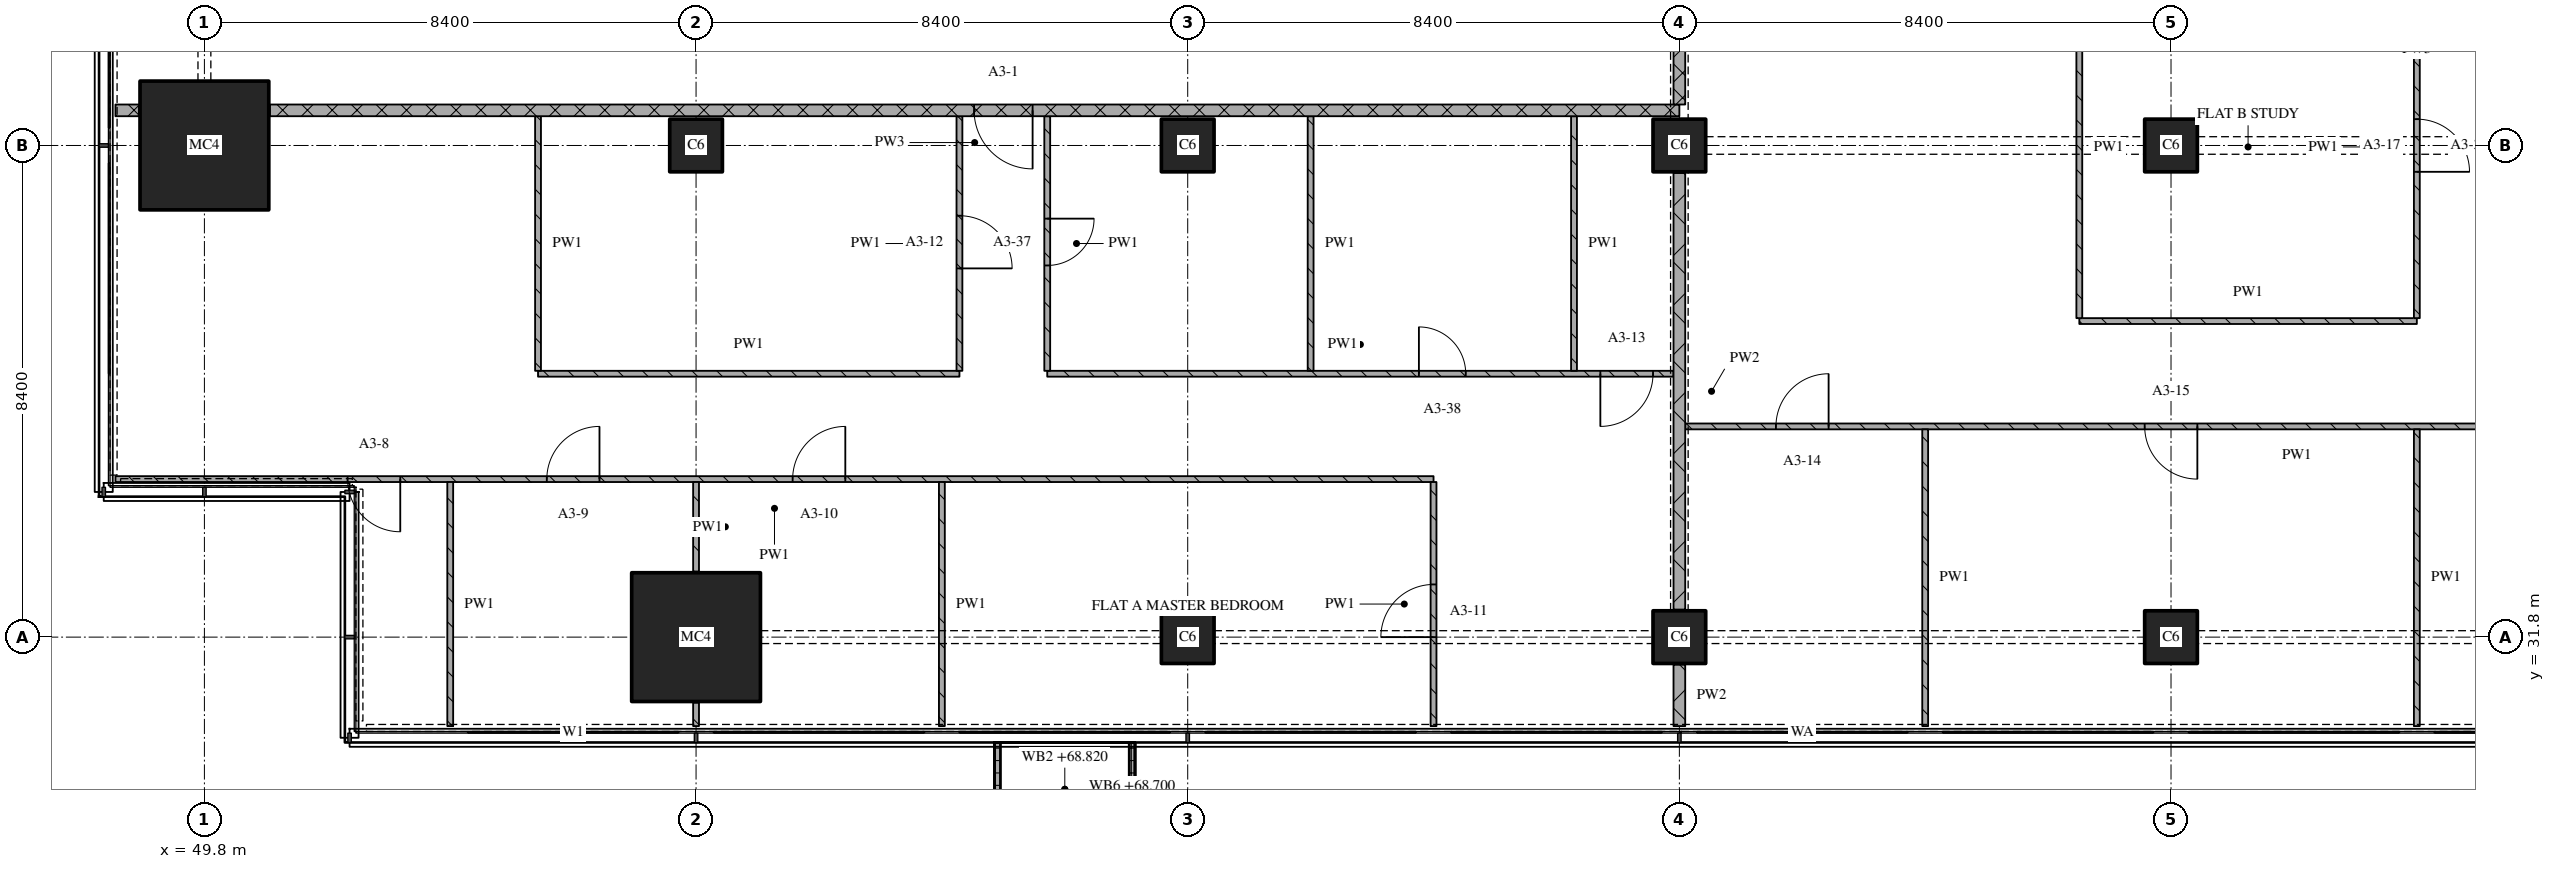
"""IFC4 building model, lengths in metres.
Left out: names, types, materials, properties, quantities, classifications, styles, units other than length and angle.
Written with IfcOpenShell. Run it as: python <this file> out.ifc"""

import sys

from ifc_helpers import new_model, si_unit, direction, frame, frame_2d, origin, origin_2d, place, context, subcontext, project, spatial, polyline, rectangle, outline, extrude, element, fill, save


model = new_model("IFC4")
c1 = context("Model", 3, precision=1e-05, world=origin(), true_north=direction((0.0, 1.0)))
c2 = subcontext(c1, "Body", "Model", "MODEL_VIEW")
j1 = project(units=[si_unit("LENGTHUNIT", "METRE"), si_unit("PLANEANGLEUNIT", "RADIAN")], contexts=[c1])
p1 = place(None, origin())
s1 = spatial("IfcSite", under=j1, at=p1, CompositionType="ELEMENT")
p2 = place(p1, origin())
s2 = spatial("IfcBuilding", under=s1, at=p2, CompositionType="ELEMENT")
p3 = place(p2, frame((0.0, 0.0, 66.0)))
s3 = spatial("IfcBuildingStorey", under=s2, at=p3, CompositionType="ELEMENT", Elevation=66.0)
for number, where, z_axis, x_axis in (
    (1, (49.8, 40.2, 0.0), (0.0, 0.0, 1.0), (1.0, 0.0, 0.0)),
    (2, (58.2, 31.8, 0.0), (0.0, 0.0, 1.0), (1.0, 0.0, 0.0)),
):
    element("IfcColumn", number, at=place(p3, frame(where, z_axis=z_axis, x_axis=x_axis)), inside=s3, PredefinedType="COLUMN", context=c2, shape_type="SweptSolid", body=[
        extrude(rectangle(XDim=2.2, YDim=2.2, at=origin_2d()), origin(), (0.0, 0.0, 1.0), 3.6),
    ])
for number, where, z_axis, x_axis in (
    (3, (58.2, 40.2, 0.0), (0.0, 0.0, 1.0), (1.0, 0.0, 0.0)),
    (4, (66.6, 31.8, 0.0), (0.0, 0.0, 1.0), (1.0, 0.0, 0.0)),
    (5, (66.6, 40.2, 0.0), (0.0, 0.0, 1.0), (1.0, 0.0, 0.0)),
    (6, (75.0, 31.8, 0.0), (0.0, 0.0, 1.0), (1.0, 0.0, 0.0)),
    (7, (75.0, 40.2, 0.0), (0.0, 0.0, 1.0), (1.0, 0.0, 0.0)),
    (8, (83.4, 31.8, 0.0), (0.0, 0.0, 1.0), (1.0, 0.0, 0.0)),
    (9, (83.4, 40.2, 0.0), (0.0, 0.0, 1.0), (1.0, 0.0, 0.0)),
):
    element("IfcColumn", number, at=place(p3, frame(where, z_axis=z_axis, x_axis=x_axis)), inside=s3, PredefinedType="COLUMN", context=c2, shape_type="SweptSolid", body=[
        extrude(rectangle(XDim=0.9, YDim=0.9, at=origin_2d()), origin(), (0.0, 0.0, 1.0), 3.6),
    ])
p4 = place(p3, origin())
e10 = element("IfcWall", 10, at=p4, inside=s3, PredefinedType="SOLIDWALL", context=c2, shape_type="SweptSolid", body=[
    extrude(outline(polyline([(63.3, 30.0), (63.4, 30.0), (63.4, 28.5), (65.6, 28.5), (65.6, 30.0), (65.7, 30.0), (65.7, 28.4), (63.3, 28.4), (63.3, 30.0)])), origin(), (0.0, 0.0, 1.0), 1.0),
])
p5 = place(p3, frame((70.8, 34.5, 0.0), z_axis=(0.0, 0.0, 1.0), x_axis=(-1.0, 0.0, 0.0)))
e11 = element("IfcWall", 11, at=p5, inside=s3, PredefinedType="PARTITIONING", context=c2, shape_type="SweptSolid", body=[
    extrude(rectangle(XDim=22.52, YDim=0.1, at=frame_2d((11.26, 0.0))), origin(), (0.0, 0.0, 1.0), 3.32),
])
p6 = place(p5, frame((10.05, 0.0, 0.0)))
e12 = element("IfcOpeningElement", 12, at=p6, cuts=e11, PredefinedType="OPENING", context=c2, shape_type="SweptSolid", body=[
    extrude(rectangle(XDim=0.9, YDim=2.1, at=frame_2d((0.45, 1.05))), frame((0.0, 0.06, 0.0), z_axis=(0.0, -1.0, 0.0), x_axis=(1.0, 0.0, 0.0)), (0.0, 0.0, 1.0), 0.12),
])
p7 = place(p5, frame((14.25, 0.0, 0.0)))
e13 = element("IfcOpeningElement", 13, at=p7, cuts=e11, PredefinedType="OPENING", context=c2, shape_type="SweptSolid", body=[
    extrude(rectangle(XDim=0.9, YDim=2.1, at=frame_2d((0.45, 1.05))), frame((0.0, 0.06, 0.0), z_axis=(0.0, -1.0, 0.0), x_axis=(1.0, 0.0, 0.0)), (0.0, 0.0, 1.0), 0.12),
])
p8 = place(p5, frame((17.654, 0.0, 0.0)))
e14 = element("IfcOpeningElement", 14, at=p8, cuts=e11, PredefinedType="OPENING", context=c2, shape_type="SweptSolid", body=[
    extrude(rectangle(XDim=0.9, YDim=2.1, at=frame_2d((0.45, 1.05))), frame((0.0, 0.06, 0.0), z_axis=(0.0, -1.0, 0.0), x_axis=(1.0, 0.0, 0.0)), (0.0, 0.0, 1.0), 0.12),
])
p9 = place(p3, frame((96.0, 35.4, 0.0), z_axis=(0.0, 0.0, 1.0), x_axis=(-1.0, 0.0, 0.0)))
e15 = element("IfcWall", 15, at=p9, inside=s3, PredefinedType="PARTITIONING", context=c2, shape_type="SweptSolid", body=[
    extrude(rectangle(XDim=20.9, YDim=0.1, at=frame_2d((10.45, 0.0))), origin(), (0.0, 0.0, 1.0), 3.32),
])
p10 = place(p9, frame((12.15, 0.0, 0.0)))
e16 = element("IfcOpeningElement", 16, at=p10, cuts=e15, PredefinedType="OPENING", context=c2, shape_type="SweptSolid", body=[
    extrude(rectangle(XDim=0.9, YDim=2.1, at=frame_2d((0.45, 1.05))), frame((0.0, 0.06, 0.0), z_axis=(0.0, -1.0, 0.0), x_axis=(1.0, 0.0, 0.0)), (0.0, 0.0, 1.0), 0.12),
])
p11 = place(p9, frame((18.45, 0.0, 0.0)))
e17 = element("IfcOpeningElement", 17, at=p11, cuts=e15, PredefinedType="OPENING", context=c2, shape_type="SweptSolid", body=[
    extrude(rectangle(XDim=0.9, YDim=2.1, at=frame_2d((0.45, 1.05))), frame((0.0, 0.06, 0.0), z_axis=(0.0, -1.0, 0.0), x_axis=(1.0, 0.0, 0.0)), (0.0, 0.0, 1.0), 0.12),
])
p12 = place(p3, frame((55.5, 36.3, 0.0), z_axis=(0.0, 0.0, 1.0), x_axis=(1.0, 0.0, 0.0)))
e18 = element("IfcWall", 18, at=p12, inside=s3, PredefinedType="PARTITIONING", context=c2, shape_type="SweptSolid", body=[
    extrude(rectangle(XDim=7.2, YDim=0.1, at=frame_2d((3.6, 0.0))), origin(), (0.0, 0.0, 1.0), 3.32),
])
p13 = place(p3, frame((64.2, 36.3, 0.0), z_axis=(0.0, 0.0, 1.0), x_axis=(1.0, 0.0, 0.0)))
e19 = element("IfcWall", 19, at=p13, inside=s3, PredefinedType="PARTITIONING", context=c2, shape_type="SweptSolid", body=[
    extrude(rectangle(XDim=10.7, YDim=0.1, at=frame_2d((5.35, 0.0))), origin(), (0.0, 0.0, 1.0), 3.32),
])
p14 = place(p13, frame((6.35, 0.0, 0.0)))
e20 = element("IfcOpeningElement", 20, at=p14, cuts=e19, PredefinedType="OPENING", context=c2, shape_type="SweptSolid", body=[
    extrude(rectangle(XDim=0.8, YDim=2.1, at=frame_2d((0.4, 1.05))), frame((0.0, 0.06, 0.0), z_axis=(0.0, -1.0, 0.0), x_axis=(1.0, 0.0, 0.0)), (0.0, 0.0, 1.0), 0.12),
])
p15 = place(p13, frame((9.45, 0.0, 0.0)))
e21 = element("IfcOpeningElement", 21, at=p15, cuts=e19, PredefinedType="OPENING", context=c2, shape_type="SweptSolid", body=[
    extrude(rectangle(XDim=0.9, YDim=2.1, at=frame_2d((0.45, 1.05))), frame((0.0, 0.06, 0.0), z_axis=(0.0, -1.0, 0.0), x_axis=(1.0, 0.0, 0.0)), (0.0, 0.0, 1.0), 0.12),
])
p16 = place(p3, frame((81.833, 37.2, 0.0), z_axis=(0.0, 0.0, 1.0), x_axis=(1.0, 0.0, 0.0)))
e22 = element("IfcWall", 22, at=p16, inside=s3, PredefinedType="PARTITIONING", context=c2, shape_type="SweptSolid", body=[
    extrude(rectangle(XDim=5.767, YDim=0.1, at=frame_2d((2.883, 0.0))), origin(), (0.0, 0.0, 1.0), 3.32),
])
p17 = place(p3, frame((48.28, 40.8, 0.0), z_axis=(0.0, 0.0, 1.0), x_axis=(1.0, 0.0, 0.0)))
e23 = element("IfcWall", 23, at=p17, inside=s3, PredefinedType="PARTITIONING", context=c2, shape_type="SweptSolid", body=[
    extrude(rectangle(XDim=0.4, YDim=0.2, at=frame_2d((0.2, 0.0))), origin(), (0.0, 0.0, 1.0), 3.32),
])
p18 = place(p3, frame((75.0, 40.8, 0.0), z_axis=(0.0, 0.0, 1.0), x_axis=(-1.0, 0.0, 0.0)))
e24 = element("IfcWall", 24, at=p18, inside=s3, PredefinedType="PARTITIONING", context=c2, shape_type="SweptSolid", body=[
    extrude(rectangle(XDim=24.08, YDim=0.2, at=frame_2d((12.04, 0.0))), origin(), (0.0, 0.0, 1.0), 3.32),
])
p19 = place(p18, frame((11.05, 0.0, 0.0)))
e25 = element("IfcOpeningElement", 25, at=p19, cuts=e24, PredefinedType="OPENING", context=c2, shape_type="SweptSolid", body=[
    extrude(rectangle(XDim=1.0, YDim=2.1, at=frame_2d((0.5, 1.05))), frame((0.0, 0.11, 0.0), z_axis=(0.0, -1.0, 0.0), x_axis=(1.0, 0.0, 0.0)), (0.0, 0.0, 1.0), 0.22),
])
p20 = place(p3, frame((54.0, 34.45, 0.0), z_axis=(0.0, 0.0, 1.0), x_axis=(0.0, -1.0, 0.0)))
e26 = element("IfcWall", 26, at=p20, inside=s3, PredefinedType="PARTITIONING", context=c2, shape_type="SweptSolid", body=[
    extrude(rectangle(XDim=4.17, YDim=0.1, at=frame_2d((2.085, 0.0))), origin(), (0.0, 0.0, 1.0), 3.32),
])
p21 = place(p3, frame((55.5, 40.7, 0.0), z_axis=(0.0, 0.0, 1.0), x_axis=(0.0, -1.0, 0.0)))
e27 = element("IfcWall", 27, at=p21, inside=s3, PredefinedType="PARTITIONING", context=c2, shape_type="SweptSolid", body=[
    extrude(rectangle(XDim=4.35, YDim=0.1, at=frame_2d((2.175, 0.0))), origin(), (0.0, 0.0, 1.0), 3.32),
])
p22 = place(p3, frame((58.2, 30.68, 0.0), z_axis=(0.0, 0.0, 1.0), x_axis=(0.0, -1.0, 0.0)))
e28 = element("IfcWall", 28, at=p22, inside=s3, PredefinedType="PARTITIONING", context=c2, shape_type="SweptSolid", body=[
    extrude(rectangle(XDim=0.4, YDim=0.1, at=frame_2d((0.2, 0.0))), origin(), (0.0, 0.0, 1.0), 3.32),
])
p23 = place(p3, frame((58.2, 34.45, 0.0), z_axis=(0.0, 0.0, 1.0), x_axis=(0.0, -1.0, 0.0)))
e29 = element("IfcWall", 29, at=p23, inside=s3, PredefinedType="PARTITIONING", context=c2, shape_type="SweptSolid", body=[
    extrude(rectangle(XDim=1.53, YDim=0.1, at=frame_2d((0.765, 0.0))), origin(), (0.0, 0.0, 1.0), 3.32),
])
p24 = place(p3, frame((62.4, 34.45, 0.0), z_axis=(0.0, 0.0, 1.0), x_axis=(0.0, -1.0, 0.0)))
e30 = element("IfcWall", 30, at=p24, inside=s3, PredefinedType="PARTITIONING", context=c2, shape_type="SweptSolid", body=[
    extrude(rectangle(XDim=4.17, YDim=0.1, at=frame_2d((2.085, 0.0))), origin(), (0.0, 0.0, 1.0), 3.32),
])
p25 = place(p3, frame((62.7, 36.35, 0.0), z_axis=(0.0, 0.0, 1.0), x_axis=(0.0, 1.0, 0.0)))
e31 = element("IfcWall", 31, at=p25, inside=s3, PredefinedType="PARTITIONING", context=c2, shape_type="SweptSolid", body=[
    extrude(rectangle(XDim=4.35, YDim=0.1, at=frame_2d((2.175, 0.0))), origin(), (0.0, 0.0, 1.0), 3.32),
])
p26 = place(p25, frame((1.75, 0.0, 0.0)))
e32 = element("IfcOpeningElement", 32, at=p26, cuts=e31, PredefinedType="OPENING", context=c2, shape_type="SweptSolid", body=[
    extrude(rectangle(XDim=0.9, YDim=2.1, at=frame_2d((0.45, 1.05))), frame((0.0, 0.06, 0.0), z_axis=(0.0, -1.0, 0.0), x_axis=(1.0, 0.0, 0.0)), (0.0, 0.0, 1.0), 0.12),
])
p27 = place(p3, frame((64.2, 40.7, 0.0), z_axis=(0.0, 0.0, 1.0), x_axis=(0.0, -1.0, 0.0)))
e33 = element("IfcWall", 33, at=p27, inside=s3, PredefinedType="PARTITIONING", context=c2, shape_type="SweptSolid", body=[
    extrude(rectangle(XDim=4.35, YDim=0.1, at=frame_2d((2.175, 0.0))), origin(), (0.0, 0.0, 1.0), 3.32),
])
p28 = place(p27, frame((1.75, 0.0, 0.0)))
e34 = element("IfcOpeningElement", 34, at=p28, cuts=e33, PredefinedType="OPENING", context=c2, shape_type="SweptSolid", body=[
    extrude(rectangle(XDim=0.8, YDim=2.1, at=frame_2d((0.4, 1.05))), frame((0.0, 0.06, 0.0), z_axis=(0.0, -1.0, 0.0), x_axis=(1.0, 0.0, 0.0)), (0.0, 0.0, 1.0), 0.12),
])
p29 = place(p3, frame((68.7, 40.7, 0.0), z_axis=(0.0, 0.0, 1.0), x_axis=(0.0, -1.0, 0.0)))
e35 = element("IfcWall", 35, at=p29, inside=s3, PredefinedType="PARTITIONING", context=c2, shape_type="SweptSolid", body=[
    extrude(rectangle(XDim=4.35, YDim=0.1, at=frame_2d((2.175, 0.0))), origin(), (0.0, 0.0, 1.0), 3.32),
])
p30 = place(p3, frame((70.8, 30.28, 0.0), z_axis=(0.0, 0.0, 1.0), x_axis=(0.0, 1.0, 0.0)))
e36 = element("IfcWall", 36, at=p30, inside=s3, PredefinedType="PARTITIONING", context=c2, shape_type="SweptSolid", body=[
    extrude(rectangle(XDim=4.17, YDim=0.1, at=frame_2d((2.085, 0.0))), origin(), (0.0, 0.0, 1.0), 3.32),
])
p31 = place(p30, frame((1.52, 0.0, 0.0)))
e37 = element("IfcOpeningElement", 37, at=p31, cuts=e36, PredefinedType="OPENING", context=c2, shape_type="SweptSolid", body=[
    extrude(rectangle(XDim=0.9, YDim=2.1, at=frame_2d((0.45, 1.05))), frame((0.0, 0.06, 0.0), z_axis=(0.0, -1.0, 0.0), x_axis=(1.0, 0.0, 0.0)), (0.0, 0.0, 1.0), 0.12),
])
p32 = place(p3, frame((73.2, 40.7, 0.0), z_axis=(0.0, 0.0, 1.0), x_axis=(0.0, -1.0, 0.0)))
e38 = element("IfcWall", 38, at=p32, inside=s3, PredefinedType="PARTITIONING", context=c2, shape_type="SweptSolid", body=[
    extrude(rectangle(XDim=4.35, YDim=0.1, at=frame_2d((2.175, 0.0))), origin(), (0.0, 0.0, 1.0), 3.32),
])
p33 = place(p3, frame((75.0, 43.1, 0.0), z_axis=(0.0, 0.0, 1.0), x_axis=(0.0, -1.0, 0.0)))
e39 = element("IfcWall", 39, at=p33, inside=s3, PredefinedType="PARTITIONING", context=c2, shape_type="SweptSolid", body=[
    extrude(rectangle(XDim=2.2, YDim=0.2, at=frame_2d((1.1, 0.0))), origin(), (0.0, 0.0, 1.0), 2.43),
])
p34 = place(p3, frame((75.0, 31.33, 0.0), z_axis=(0.0, 0.0, 1.0), x_axis=(0.0, -1.0, 0.0)))
e40 = element("IfcWall", 40, at=p34, inside=s3, PredefinedType="PARTITIONING", context=c2, shape_type="SweptSolid", body=[
    extrude(rectangle(XDim=1.05, YDim=0.2, at=frame_2d((0.525, 0.0))), origin(), (0.0, 0.0, 1.0), 3.32),
])
p35 = place(p3, frame((75.0, 39.73, 0.0), z_axis=(0.0, 0.0, 1.0), x_axis=(0.0, -1.0, 0.0)))
e41 = element("IfcWall", 41, at=p35, inside=s3, PredefinedType="PARTITIONING", context=c2, shape_type="SweptSolid", body=[
    extrude(rectangle(XDim=7.46, YDim=0.2, at=frame_2d((3.73, 0.0))), origin(), (0.0, 0.0, 1.0), 2.83),
])
p36 = place(p3, frame((79.2, 35.35, 0.0), z_axis=(0.0, 0.0, 1.0), x_axis=(0.0, -1.0, 0.0)))
e42 = element("IfcWall", 42, at=p36, inside=s3, PredefinedType="PARTITIONING", context=c2, shape_type="SweptSolid", body=[
    extrude(rectangle(XDim=5.07, YDim=0.1, at=frame_2d((2.535, 0.0))), origin(), (0.0, 0.0, 1.0), 3.32),
])
p37 = place(p3, frame((81.833, 43.1, 0.0), z_axis=(0.0, 0.0, 1.0), x_axis=(0.0, -1.0, 0.0)))
e43 = element("IfcWall", 43, at=p37, inside=s3, PredefinedType="PARTITIONING", context=c2, shape_type="SweptSolid", body=[
    extrude(rectangle(XDim=5.85, YDim=0.1, at=frame_2d((2.925, 0.0))), origin(), (0.0, 0.0, 1.0), 3.32),
])
p38 = place(p3, frame((87.6, 35.35, 0.0), z_axis=(0.0, 0.0, 1.0), x_axis=(0.0, -1.0, 0.0)))
e44 = element("IfcWall", 44, at=p38, inside=s3, PredefinedType="PARTITIONING", context=c2, shape_type="SweptSolid", body=[
    extrude(rectangle(XDim=5.07, YDim=0.1, at=frame_2d((2.535, 0.0))), origin(), (0.0, 0.0, 1.0), 3.32),
])
p39 = place(p3, frame((87.6, 37.25, 0.0), z_axis=(0.0, 0.0, 1.0), x_axis=(0.0, 1.0, 0.0)))
e45 = element("IfcWall", 45, at=p39, inside=s3, PredefinedType="PARTITIONING", context=c2, shape_type="SweptSolid", body=[
    extrude(rectangle(XDim=5.85, YDim=0.1, at=frame_2d((2.925, 0.0))), origin(), (0.0, 0.0, 1.0), 3.32),
])
p40 = place(p39, frame((2.5, 0.0, 0.0)))
e46 = element("IfcOpeningElement", 46, at=p40, cuts=e45, PredefinedType="OPENING", context=c2, shape_type="SweptSolid", body=[
    extrude(rectangle(XDim=0.9, YDim=2.1, at=frame_2d((0.45, 1.05))), frame((0.0, 0.06, 0.0), z_axis=(0.0, -1.0, 0.0), x_axis=(1.0, 0.0, 0.0)), (0.0, 0.0, 1.0), 0.12),
])
p41 = place(p6, origin())
e47 = element("IfcDoor", 47, at=p41, inside=s3, OperationType="SINGLE_SWING_RIGHT", PredefinedType="DOOR", context=c2, shape_type="SweptSolid", body=[
    extrude(rectangle(XDim=0.9, YDim=2.1, at=frame_2d((0.45, 1.05))), frame((0.0, 0.025, 0.0), z_axis=(0.0, -1.0, 0.0), x_axis=(1.0, 0.0, 0.0)), (0.0, 0.0, 1.0), 0.05),
])
fill(e12, e47)
p42 = place(p7, origin())
e48 = element("IfcDoor", 48, at=p42, inside=s3, OperationType="SINGLE_SWING_RIGHT", PredefinedType="DOOR", context=c2, shape_type="SweptSolid", body=[
    extrude(rectangle(XDim=0.9, YDim=2.1, at=frame_2d((0.45, 1.05))), frame((0.0, 0.025, 0.0), z_axis=(0.0, -1.0, 0.0), x_axis=(1.0, 0.0, 0.0)), (0.0, 0.0, 1.0), 0.05),
])
fill(e13, e48)
p43 = place(p8, origin())
e49 = element("IfcDoor", 49, at=p43, inside=s3, OperationType="SINGLE_SWING_LEFT", PredefinedType="DOOR", context=c2, shape_type="SweptSolid", body=[
    extrude(rectangle(XDim=0.9, YDim=2.1, at=frame_2d((0.45, 1.05))), frame((0.0, 0.025, 0.0), z_axis=(0.0, -1.0, 0.0), x_axis=(1.0, 0.0, 0.0)), (0.0, 0.0, 1.0), 0.05),
])
fill(e14, e49)
p44 = place(p10, origin())
e50 = element("IfcDoor", 50, at=p44, inside=s3, OperationType="SINGLE_SWING_LEFT", PredefinedType="DOOR", context=c2, shape_type="SweptSolid", body=[
    extrude(rectangle(XDim=0.9, YDim=2.1, at=frame_2d((0.45, 1.05))), frame((0.0, 0.025, 0.0), z_axis=(0.0, -1.0, 0.0), x_axis=(1.0, 0.0, 0.0)), (0.0, 0.0, 1.0), 0.05),
])
fill(e16, e50)
p45 = place(p11, origin())
e51 = element("IfcDoor", 51, at=p45, inside=s3, OperationType="SINGLE_SWING_RIGHT", PredefinedType="DOOR", context=c2, shape_type="SweptSolid", body=[
    extrude(rectangle(XDim=0.9, YDim=2.1, at=frame_2d((0.45, 1.05))), frame((0.0, 0.025, 0.0), z_axis=(0.0, -1.0, 0.0), x_axis=(1.0, 0.0, 0.0)), (0.0, 0.0, 1.0), 0.05),
])
fill(e17, e51)
p46 = place(p14, origin())
e52 = element("IfcDoor", 52, at=p46, inside=s3, OperationType="SINGLE_SWING_LEFT", PredefinedType="DOOR", context=c2, shape_type="SweptSolid", body=[
    extrude(rectangle(XDim=0.8, YDim=2.1, at=frame_2d((0.4, 1.05))), frame((0.0, 0.025, 0.0), z_axis=(0.0, -1.0, 0.0), x_axis=(1.0, 0.0, 0.0)), (0.0, 0.0, 1.0), 0.05),
])
fill(e20, e52)
p47 = place(p15, origin())
e53 = element("IfcDoor", 53, at=p47, inside=s3, OperationType="SINGLE_SWING_RIGHT", PredefinedType="DOOR", context=c2, shape_type="SweptSolid", body=[
    extrude(rectangle(XDim=0.9, YDim=2.1, at=frame_2d((0.45, 1.05))), frame((0.0, 0.025, 0.0), z_axis=(0.0, -1.0, 0.0), x_axis=(1.0, 0.0, 0.0)), (0.0, 0.0, 1.0), 0.05),
])
fill(e21, e53)
p48 = place(p19, origin())
e54 = element("IfcDoor", 54, at=p48, inside=s3, OperationType="SINGLE_SWING_LEFT", PredefinedType="DOOR", context=c2, shape_type="SweptSolid", body=[
    extrude(rectangle(XDim=1.0, YDim=2.1, at=frame_2d((0.5, 1.05))), frame((0.0, 0.025, 0.0), z_axis=(0.0, -1.0, 0.0), x_axis=(1.0, 0.0, 0.0)), (0.0, 0.0, 1.0), 0.05),
])
fill(e25, e54)
p49 = place(p26, origin())
e55 = element("IfcDoor", 55, at=p49, inside=s3, OperationType="SINGLE_SWING_RIGHT", PredefinedType="DOOR", context=c2, shape_type="SweptSolid", body=[
    extrude(rectangle(XDim=0.9, YDim=2.1, at=frame_2d((0.45, 1.05))), frame((0.0, 0.025, 0.0), z_axis=(0.0, -1.0, 0.0), x_axis=(1.0, 0.0, 0.0)), (0.0, 0.0, 1.0), 0.05),
])
fill(e32, e55)
p50 = place(p28, origin())
e56 = element("IfcDoor", 56, at=p50, inside=s3, OperationType="SINGLE_SWING_LEFT", PredefinedType="DOOR", context=c2, shape_type="SweptSolid", body=[
    extrude(rectangle(XDim=0.8, YDim=2.1, at=frame_2d((0.4, 1.05))), frame((0.0, 0.025, 0.0), z_axis=(0.0, -1.0, 0.0), x_axis=(1.0, 0.0, 0.0)), (0.0, 0.0, 1.0), 0.05),
])
fill(e34, e56)
p51 = place(p31, origin())
e57 = element("IfcDoor", 57, at=p51, inside=s3, OperationType="SINGLE_SWING_LEFT", PredefinedType="DOOR", context=c2, shape_type="SweptSolid", body=[
    extrude(rectangle(XDim=0.9, YDim=2.1, at=frame_2d((0.45, 1.05))), frame((0.0, 0.025, 0.0), z_axis=(0.0, -1.0, 0.0), x_axis=(1.0, 0.0, 0.0)), (0.0, 0.0, 1.0), 0.05),
])
fill(e37, e57)
p52 = place(p40, origin())
e58 = element("IfcDoor", 58, at=p52, inside=s3, OperationType="SINGLE_SWING_RIGHT", PredefinedType="DOOR", context=c2, shape_type="SweptSolid", body=[
    extrude(rectangle(XDim=0.9, YDim=2.1, at=frame_2d((0.45, 1.05))), frame((0.0, 0.025, 0.0), z_axis=(0.0, -1.0, 0.0), x_axis=(1.0, 0.0, 0.0)), (0.0, 0.0, 1.0), 0.05),
])
fill(e46, e58)
save(model, sys.argv[1])
